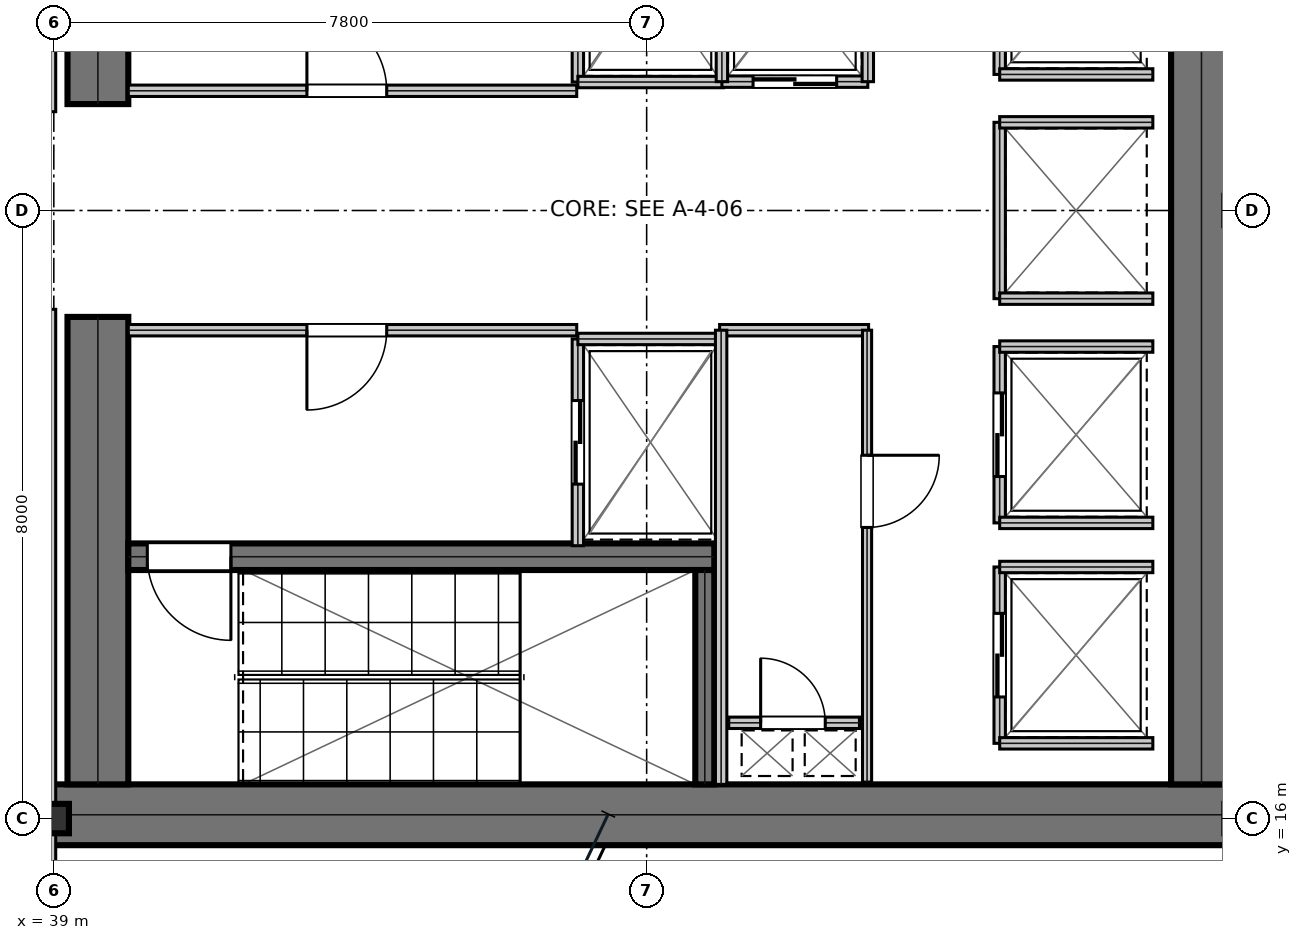
"""IFC4 building model, lengths in metres.
Left out: names, types, materials, properties, quantities, classifications, styles, units other than length and angle.
Written with IfcOpenShell. Run it as: python <this file> out.ifc"""

import sys

from ifc_helpers import new_model, si_unit, direction, frame, frame_2d, origin, origin_2d, place, context, subcontext, project, spatial, rectangle, i_section, extrude, element, fill, save


model = new_model("IFC4")
c1 = context("Model", 3, precision=1e-05, world=origin(), true_north=direction((0.0, 1.0)))
c2 = subcontext(c1, "Body", "Model", "MODEL_VIEW")
j1 = project(units=[si_unit("LENGTHUNIT", "METRE"), si_unit("PLANEANGLEUNIT", "RADIAN")], contexts=[c1])
p1 = place(None, origin())
s1 = spatial("IfcSite", under=j1, at=p1, CompositionType="ELEMENT")
p2 = place(p1, origin())
s2 = spatial("IfcBuilding", under=s1, at=p2, CompositionType="ELEMENT")
p3 = place(p2, frame((0.0, 0.0, 112.05)))
s3 = spatial("IfcBuildingStorey", under=s2, at=p3, CompositionType="ELEMENT", Elevation=112.05)
p4 = place(p3, frame((38.8, 16.05, 0.0), z_axis=(0.0, 0.0, 1.0), x_axis=(1.0, 0.0, 0.0)))
e1 = element("IfcWall", 1, at=p4, inside=s3, PredefinedType="SHEAR", context=c2, shape_type="SweptSolid", body=[
    extrude(rectangle(XDim=16.0, YDim=0.8, at=frame_2d((8.0, 0.0))), origin(), (0.0, 0.0, 1.0), 4.56),
])
for number, where, z_axis, x_axis in (
    (2, (39.58, 16.45, 0.0), (0.0, 0.0, 1.0), (0.0, 1.0, 0.0)),
    (3, (39.58, 25.4, 0.0), (0.0, 0.0, 1.0), (0.0, 1.0, 0.0)),
):
    element("IfcWall", number, at=place(p3, frame(where, z_axis=z_axis, x_axis=x_axis)), inside=s3, PredefinedType="SHEAR", context=c2, shape_type="SweptSolid", body=[
        extrude(rectangle(XDim=6.15, YDim=0.8, at=frame_2d((3.075, 0.0))), origin(), (0.0, 0.0, 1.0), 4.56),
    ])
p5 = place(p3, frame((54.1, 16.45, 0.0), z_axis=(0.0, 0.0, 1.0), x_axis=(0.0, 1.0, 0.0)))
e4 = element("IfcWall", 4, at=p5, inside=s3, PredefinedType="SHEAR", context=c2, shape_type="SweptSolid", body=[
    extrude(rectangle(XDim=15.1, YDim=0.8, at=frame_2d((7.55, 0.0))), origin(), (0.0, 0.0, 1.0), 4.56),
])
p6 = place(p3, frame((39.98, 19.445, 0.0), z_axis=(0.0, 0.0, 1.0), x_axis=(1.0, 0.0, 0.0)))
e5 = element("IfcWall", 5, at=p6, inside=s3, PredefinedType="SHEAR", context=c2, shape_type="SweptSolid", body=[
    extrude(rectangle(XDim=7.71, YDim=0.35, at=frame_2d((3.855, 0.0))), origin(), (0.0, 0.0, 1.0), 4.56),
])
p7 = place(p6, frame((0.25, 0.0, 0.0)))
e6 = element("IfcOpeningElement", 6, at=p7, cuts=e5, PredefinedType="OPENING", context=c2, shape_type="SweptSolid", body=[
    extrude(rectangle(XDim=1.1, YDim=2.15, at=frame_2d((0.55, 1.075))), frame((0.0, 0.185, 0.0), z_axis=(0.0, -1.0, 0.0), x_axis=(1.0, 0.0, 0.0)), (0.0, 0.0, 1.0), 0.37),
])
p8 = place(p3, frame((47.565, 16.45, 0.0), z_axis=(0.0, 0.0, 1.0), x_axis=(0.0, 1.0, 0.0)))
e7 = element("IfcWall", 7, at=p8, inside=s3, PredefinedType="SHEAR", context=c2, shape_type="SweptSolid", body=[
    extrude(rectangle(XDim=2.82, YDim=0.25, at=frame_2d((1.41, 0.0))), origin(), (0.0, 0.0, 1.0), 4.56),
])
p9 = place(p3, frame((39.0, 16.0, 0.0), z_axis=(0.0, 0.0, 1.0), x_axis=(1.0, 0.0, 0.0)))
e8 = element("IfcColumn", 8, at=p9, inside=s3, PredefinedType="COLUMN", context=c2, shape_type="SweptSolid", body=[
    extrude(i_section(OverallWidth=0.398, OverallDepth=0.387, WebThickness=0.021, FlangeThickness=0.033, at=origin_2d()), origin(), (0.0, 0.0, 1.0), 4.794),
])
p10 = place(p3, frame((39.98, 25.575, 0.0), z_axis=(0.0, 0.0, 1.0), x_axis=(1.0, 0.0, 0.0)))
e9 = element("IfcWall", 9, at=p10, inside=s3, PredefinedType="PARTITIONING", context=c2, shape_type="SweptSolid", body=[
    extrude(rectangle(XDim=5.9, YDim=0.15, at=frame_2d((2.95, 0.0))), origin(), (0.0, 0.0, 1.0), 4.56),
])
p11 = place(p10, frame((2.35, 0.0, 0.0)))
e10 = element("IfcOpeningElement", 10, at=p11, cuts=e9, PredefinedType="OPENING", context=c2, shape_type="SweptSolid", body=[
    extrude(rectangle(XDim=1.05, YDim=2.15, at=frame_2d((0.525, 1.075))), frame((0.0, 0.085, 0.0), z_axis=(0.0, -1.0, 0.0), x_axis=(1.0, 0.0, 0.0)), (0.0, 0.0, 1.0), 0.17),
])
p12 = place(p3, frame((39.98, 22.425, 0.0), z_axis=(0.0, 0.0, 1.0), x_axis=(1.0, 0.0, 0.0)))
e11 = element("IfcWall", 11, at=p12, inside=s3, PredefinedType="PARTITIONING", context=c2, shape_type="SweptSolid", body=[
    extrude(rectangle(XDim=5.9, YDim=0.15, at=frame_2d((2.95, 0.0))), origin(), (0.0, 0.0, 1.0), 4.56),
])
p13 = place(p12, frame((2.35, 0.0, 0.0)))
e12 = element("IfcOpeningElement", 12, at=p13, cuts=e11, PredefinedType="OPENING", context=c2, shape_type="SweptSolid", body=[
    extrude(rectangle(XDim=1.05, YDim=2.15, at=frame_2d((0.525, 1.075))), frame((0.0, 0.085, 0.0), z_axis=(0.0, -1.0, 0.0), x_axis=(1.0, 0.0, 0.0)), (0.0, 0.0, 1.0), 0.17),
])
p14 = place(p3, frame((45.895, 25.69, 0.0), z_axis=(0.0, 0.0, 1.0), x_axis=(0.0, 1.0, 0.0)))
e13 = element("IfcWall", 13, at=p14, inside=s3, PredefinedType="PARTITIONING", context=c2, shape_type="SweptSolid", body=[
    extrude(rectangle(XDim=2.72, YDim=0.15, at=frame_2d((1.36, 0.0))), origin(), (0.0, 0.0, 1.0), 4.56),
])
p15 = place(p14, frame((0.81, 0.0, 0.0)))
e14 = element("IfcOpeningElement", 14, at=p15, cuts=e13, PredefinedType="OPENING", context=c2, shape_type="SweptSolid", body=[
    extrude(rectangle(XDim=1.1, YDim=2.15, at=frame_2d((0.55, 1.075))), frame((0.0, 0.085, 0.0), z_axis=(0.0, -1.0, 0.0), x_axis=(1.0, 0.0, 0.0)), (0.0, 0.0, 1.0), 0.17),
])
p16 = place(p3, frame((45.895, 25.69, 0.0), z_axis=(0.0, 0.0, 1.0), x_axis=(1.0, 0.0, 0.0)))
e15 = element("IfcWall", 15, at=p16, inside=s3, PredefinedType="PARTITIONING", context=c2, shape_type="SweptSolid", body=[
    extrude(rectangle(XDim=1.915, YDim=0.15, at=frame_2d((0.958, 0.0))), origin(), (0.0, 0.0, 1.0), 4.56),
])
p17 = place(p3, frame((45.895, 19.59, 0.0), z_axis=(0.0, 0.0, 1.0), x_axis=(0.0, 1.0, 0.0)))
e16 = element("IfcWall", 16, at=p17, inside=s3, PredefinedType="PARTITIONING", context=c2, shape_type="SweptSolid", body=[
    extrude(rectangle(XDim=2.72, YDim=0.15, at=frame_2d((1.36, 0.0))), origin(), (0.0, 0.0, 1.0), 4.56),
])
p18 = place(p17, frame((0.81, 0.0, 0.0)))
e17 = element("IfcOpeningElement", 17, at=p18, cuts=e16, PredefinedType="OPENING", context=c2, shape_type="SweptSolid", body=[
    extrude(rectangle(XDim=1.1, YDim=2.15, at=frame_2d((0.55, 1.075))), frame((0.0, 0.085, 0.0), z_axis=(0.0, -1.0, 0.0), x_axis=(1.0, 0.0, 0.0)), (0.0, 0.0, 1.0), 0.17),
])
p19 = place(p3, frame((45.895, 22.31, 0.0), z_axis=(0.0, 0.0, 1.0), x_axis=(1.0, 0.0, 0.0)))
e18 = element("IfcWall", 18, at=p19, inside=s3, PredefinedType="PARTITIONING", context=c2, shape_type="SweptSolid", body=[
    extrude(rectangle(XDim=1.915, YDim=0.15, at=frame_2d((0.958, 0.0))), origin(), (0.0, 0.0, 1.0), 4.56),
])
p20 = place(p3, frame((47.79, 25.695, 0.0), z_axis=(0.0, 0.0, 1.0), x_axis=(1.0, 0.0, 0.0)))
e19 = element("IfcWall", 19, at=p20, inside=s3, PredefinedType="PARTITIONING", context=c2, shape_type="SweptSolid", body=[
    extrude(rectangle(XDim=1.92, YDim=0.15, at=frame_2d((0.96, 0.0))), origin(), (0.0, 0.0, 1.0), 4.56),
])
p21 = place(p20, frame((0.41, 0.0, 0.0)))
e20 = element("IfcOpeningElement", 20, at=p21, cuts=e19, PredefinedType="OPENING", context=c2, shape_type="SweptSolid", body=[
    extrude(rectangle(XDim=1.1, YDim=2.15, at=frame_2d((0.55, 1.075))), frame((0.0, 0.085, 0.0), z_axis=(0.0, -1.0, 0.0), x_axis=(1.0, 0.0, 0.0)), (0.0, 0.0, 1.0), 0.17),
])
for number, where, z_axis, x_axis in (
    (21, (47.79, 25.695, 0.0), (0.0, 0.0, 1.0), (0.0, 1.0, 0.0)),
    (22, (49.71, 25.695, 0.0), (0.0, 0.0, 1.0), (0.0, 1.0, 0.0)),
):
    element("IfcWall", number, at=place(p3, frame(where, z_axis=z_axis, x_axis=x_axis)), inside=s3, PredefinedType="PARTITIONING", context=c2, shape_type="SweptSolid", body=[
        extrude(rectangle(XDim=2.415, YDim=0.15, at=frame_2d((1.208, 0.0))), origin(), (0.0, 0.0, 1.0), 4.56),
    ])
p22 = place(p3, frame((51.445, 25.79, 0.0), z_axis=(0.0, 0.0, 1.0), x_axis=(0.0, 1.0, 0.0)))
e23 = element("IfcWall", 23, at=p22, inside=s3, PredefinedType="PARTITIONING", context=c2, shape_type="SweptSolid", body=[
    extrude(rectangle(XDim=2.32, YDim=0.15, at=frame_2d((1.16, 0.0))), origin(), (0.0, 0.0, 1.0), 4.56),
])
p23 = place(p22, frame((0.61, 0.0, 0.0)))
e24 = element("IfcOpeningElement", 24, at=p23, cuts=e23, PredefinedType="OPENING", context=c2, shape_type="SweptSolid", body=[
    extrude(rectangle(XDim=1.1, YDim=2.15, at=frame_2d((0.55, 1.075))), frame((0.0, 0.085, 0.0), z_axis=(0.0, -1.0, 0.0), x_axis=(1.0, 0.0, 0.0)), (0.0, 0.0, 1.0), 0.17),
])
p24 = place(p3, frame((51.445, 25.79, 0.0), z_axis=(0.0, 0.0, 1.0), x_axis=(1.0, 0.0, 0.0)))
e25 = element("IfcWall", 25, at=p24, inside=s3, PredefinedType="PARTITIONING", context=c2, shape_type="SweptSolid", body=[
    extrude(rectangle(XDim=2.015, YDim=0.15, at=frame_2d((1.007, 0.0))), origin(), (0.0, 0.0, 1.0), 4.56),
])
p25 = place(p3, frame((51.445, 19.89, 0.0), z_axis=(0.0, 0.0, 1.0), x_axis=(0.0, 1.0, 0.0)))
e26 = element("IfcWall", 26, at=p25, inside=s3, PredefinedType="PARTITIONING", context=c2, shape_type="SweptSolid", body=[
    extrude(rectangle(XDim=2.32, YDim=0.15, at=frame_2d((1.16, 0.0))), origin(), (0.0, 0.0, 1.0), 4.56),
])
p26 = place(p25, frame((0.61, 0.0, 0.0)))
e27 = element("IfcOpeningElement", 27, at=p26, cuts=e26, PredefinedType="OPENING", context=c2, shape_type="SweptSolid", body=[
    extrude(rectangle(XDim=1.1, YDim=2.15, at=frame_2d((0.55, 1.075))), frame((0.0, 0.085, 0.0), z_axis=(0.0, -1.0, 0.0), x_axis=(1.0, 0.0, 0.0)), (0.0, 0.0, 1.0), 0.17),
])
for number, where, z_axis, x_axis in (
    (28, (51.445, 19.89, 0.0), (0.0, 0.0, 1.0), (1.0, 0.0, 0.0)),
    (29, (51.445, 22.21, 0.0), (0.0, 0.0, 1.0), (1.0, 0.0, 0.0)),
):
    element("IfcWall", number, at=place(p3, frame(where, z_axis=z_axis, x_axis=x_axis)), inside=s3, PredefinedType="PARTITIONING", context=c2, shape_type="SweptSolid", body=[
        extrude(rectangle(XDim=2.015, YDim=0.15, at=frame_2d((1.007, 0.0))), origin(), (0.0, 0.0, 1.0), 4.56),
    ])
p27 = place(p3, frame((51.445, 22.84, 0.0), z_axis=(0.0, 0.0, 1.0), x_axis=(0.0, 1.0, 0.0)))
e30 = element("IfcWall", 30, at=p27, inside=s3, PredefinedType="PARTITIONING", context=c2, shape_type="SweptSolid", body=[
    extrude(rectangle(XDim=2.32, YDim=0.15, at=frame_2d((1.16, 0.0))), origin(), (0.0, 0.0, 1.0), 4.56),
])
for number, where, z_axis, x_axis in (
    (31, (51.445, 22.84, 0.0), (0.0, 0.0, 1.0), (1.0, 0.0, 0.0)),
    (32, (51.445, 25.16, 0.0), (0.0, 0.0, 1.0), (1.0, 0.0, 0.0)),
):
    element("IfcWall", number, at=place(p3, frame(where, z_axis=z_axis, x_axis=x_axis)), inside=s3, PredefinedType="PARTITIONING", context=c2, shape_type="SweptSolid", body=[
        extrude(rectangle(XDim=2.015, YDim=0.15, at=frame_2d((1.007, 0.0))), origin(), (0.0, 0.0, 1.0), 4.56),
    ])
p28 = place(p3, frame((51.445, 16.99, 0.0), z_axis=(0.0, 0.0, 1.0), x_axis=(0.0, 1.0, 0.0)))
e33 = element("IfcWall", 33, at=p28, inside=s3, PredefinedType="PARTITIONING", context=c2, shape_type="SweptSolid", body=[
    extrude(rectangle(XDim=2.32, YDim=0.15, at=frame_2d((1.16, 0.0))), origin(), (0.0, 0.0, 1.0), 4.56),
])
p29 = place(p28, frame((0.61, 0.0, 0.0)))
e34 = element("IfcOpeningElement", 34, at=p29, cuts=e33, PredefinedType="OPENING", context=c2, shape_type="SweptSolid", body=[
    extrude(rectangle(XDim=1.1, YDim=2.15, at=frame_2d((0.55, 1.075))), frame((0.0, 0.085, 0.0), z_axis=(0.0, -1.0, 0.0), x_axis=(1.0, 0.0, 0.0)), (0.0, 0.0, 1.0), 0.17),
])
for number, where, z_axis, x_axis in (
    (35, (51.445, 16.99, 0.0), (0.0, 0.0, 1.0), (1.0, 0.0, 0.0)),
    (36, (51.445, 19.31, 0.0), (0.0, 0.0, 1.0), (1.0, 0.0, 0.0)),
):
    element("IfcWall", number, at=place(p3, frame(where, z_axis=z_axis, x_axis=x_axis)), inside=s3, PredefinedType="PARTITIONING", context=c2, shape_type="SweptSolid", body=[
        extrude(rectangle(XDim=2.015, YDim=0.15, at=frame_2d((1.007, 0.0))), origin(), (0.0, 0.0, 1.0), 4.56),
    ])
p30 = place(p3, frame((47.88, 17.26, 0.0), z_axis=(0.0, 0.0, 1.0), x_axis=(1.0, 0.0, 0.0)))
e37 = element("IfcWall", 37, at=p30, inside=s3, PredefinedType="PARTITIONING", context=c2, shape_type="SweptSolid", body=[
    extrude(rectangle(XDim=1.72, YDim=0.15, at=frame_2d((0.86, 0.0))), origin(), (0.0, 0.0, 1.0), 4.56),
])
p31 = place(p30, frame((0.42, 0.0, 0.0)))
e38 = element("IfcOpeningElement", 38, at=p31, cuts=e37, PredefinedType="OPENING", context=c2, shape_type="SweptSolid", body=[
    extrude(rectangle(XDim=0.85, YDim=2.15, at=frame_2d((0.425, 1.075))), frame((0.0, 0.085, 0.0), z_axis=(0.0, -1.0, 0.0), x_axis=(1.0, 0.0, 0.0)), (0.0, 0.0, 1.0), 0.17),
])
p32 = place(p3, frame((47.76, 22.425, 0.0), z_axis=(0.0, 0.0, 1.0), x_axis=(1.0, 0.0, 0.0)))
e39 = element("IfcWall", 39, at=p32, inside=s3, PredefinedType="PARTITIONING", context=c2, shape_type="SweptSolid", body=[
    extrude(rectangle(XDim=1.96, YDim=0.15, at=frame_2d((0.98, 0.0))), origin(), (0.0, 0.0, 1.0), 4.56),
])
p33 = place(p3, frame((47.78, 16.45, 0.0), z_axis=(0.0, 0.0, 1.0), x_axis=(0.0, 1.0, 0.0)))
e40 = element("IfcWall", 40, at=p33, inside=s3, PredefinedType="PARTITIONING", context=c2, shape_type="SweptSolid", body=[
    extrude(rectangle(XDim=5.975, YDim=0.15, at=frame_2d((2.988, 0.0))), origin(), (0.0, 0.0, 1.0), 4.56),
])
p34 = place(p3, frame((49.7, 16.48, 0.0), z_axis=(0.0, 0.0, 1.0), x_axis=(0.0, 1.0, 0.0)))
e41 = element("IfcWall", 41, at=p34, inside=s3, PredefinedType="PARTITIONING", context=c2, shape_type="SweptSolid", body=[
    extrude(rectangle(XDim=5.945, YDim=0.12, at=frame_2d((2.973, 0.0))), origin(), (0.0, 0.0, 1.0), 4.56),
])
p35 = place(p34, frame((3.35, 0.0, 0.0)))
e42 = element("IfcOpeningElement", 42, at=p35, cuts=e41, PredefinedType="OPENING", context=c2, shape_type="SweptSolid", body=[
    extrude(rectangle(XDim=0.95, YDim=2.15, at=frame_2d((0.475, 1.075))), frame((0.0, 0.07, 0.0), z_axis=(0.0, -1.0, 0.0), x_axis=(1.0, 0.0, 0.0)), (0.0, 0.0, 1.0), 0.14),
])
for number, where, z_axis, x_axis in (
    (43, (38.95, 14.5, 0.0), (0.0, 0.0, 1.0), (0.0, 1.0, 0.0)),
    (44, (38.95, 25.3, 0.0), (0.0, 0.0, 1.0), (0.0, 1.0, 0.0)),
):
    element("IfcWall", number, at=place(p3, frame(where, z_axis=z_axis, x_axis=x_axis)), inside=s3, PredefinedType="PARTITIONING", context=c2, shape_type="SweptSolid", body=[
        extrude(rectangle(XDim=8.2, YDim=0.15, at=frame_2d((4.1, 0.0))), origin(), (0.0, 0.0, 1.0), 3.94),
    ])
p36 = place(p11, origin())
e45 = element("IfcDoor", 45, at=p36, inside=s3, OperationType="SINGLE_SWING_LEFT", PredefinedType="DOOR", context=c2, shape_type="SweptSolid", body=[
    extrude(rectangle(XDim=1.05, YDim=2.15, at=frame_2d((0.525, 1.075))), frame((0.0, 0.025, 0.0), z_axis=(0.0, -1.0, 0.0), x_axis=(1.0, 0.0, 0.0)), (0.0, 0.0, 1.0), 0.05),
])
fill(e10, e45)
p37 = place(p13, frame((1.05, 0.0, 0.0), z_axis=(0.0, 0.0, 1.0), x_axis=(-1.0, 0.0, 0.0)))
e46 = element("IfcDoor", 46, at=p37, inside=s3, OperationType="SINGLE_SWING_RIGHT", PredefinedType="DOOR", context=c2, shape_type="SweptSolid", body=[
    extrude(rectangle(XDim=1.05, YDim=2.15, at=frame_2d((0.525, 1.075))), frame((0.0, 0.025, 0.0), z_axis=(0.0, -1.0, 0.0), x_axis=(1.0, 0.0, 0.0)), (0.0, 0.0, 1.0), 0.05),
])
fill(e12, e46)
p38 = place(p18, frame((1.1, 0.0, 0.0), z_axis=(0.0, 0.0, 1.0), x_axis=(-1.0, 0.0, 0.0)))
e47 = element("IfcDoor", 47, at=p38, inside=s3, OperationType="DOUBLE_DOOR_SLIDING", PredefinedType="DOOR", context=c2, shape_type="SweptSolid", body=[
    extrude(rectangle(XDim=1.1, YDim=2.15, at=frame_2d((0.55, 1.075))), frame((0.0, 0.025, 0.0), z_axis=(0.0, -1.0, 0.0), x_axis=(1.0, 0.0, 0.0)), (0.0, 0.0, 1.0), 0.05),
])
fill(e17, e47)
p39 = place(p21, frame((1.1, 0.0, 0.0), z_axis=(0.0, 0.0, 1.0), x_axis=(-1.0, 0.0, 0.0)))
e48 = element("IfcDoor", 48, at=p39, inside=s3, OperationType="DOUBLE_DOOR_SLIDING", PredefinedType="DOOR", context=c2, shape_type="SweptSolid", body=[
    extrude(rectangle(XDim=1.1, YDim=2.15, at=frame_2d((0.55, 1.075))), frame((0.0, 0.025, 0.0), z_axis=(0.0, -1.0, 0.0), x_axis=(1.0, 0.0, 0.0)), (0.0, 0.0, 1.0), 0.05),
])
fill(e20, e48)
p40 = place(p26, frame((1.1, 0.0, 0.0), z_axis=(0.0, 0.0, 1.0), x_axis=(-1.0, 0.0, 0.0)))
e49 = element("IfcDoor", 49, at=p40, inside=s3, OperationType="DOUBLE_DOOR_SLIDING", PredefinedType="DOOR", context=c2, shape_type="SweptSolid", body=[
    extrude(rectangle(XDim=1.1, YDim=2.15, at=frame_2d((0.55, 1.075))), frame((0.0, 0.025, 0.0), z_axis=(0.0, -1.0, 0.0), x_axis=(1.0, 0.0, 0.0)), (0.0, 0.0, 1.0), 0.05),
])
fill(e27, e49)
p41 = place(p29, frame((1.1, 0.0, 0.0), z_axis=(0.0, 0.0, 1.0), x_axis=(-1.0, 0.0, 0.0)))
e50 = element("IfcDoor", 50, at=p41, inside=s3, OperationType="DOUBLE_DOOR_SLIDING", PredefinedType="DOOR", context=c2, shape_type="SweptSolid", body=[
    extrude(rectangle(XDim=1.1, YDim=2.15, at=frame_2d((0.55, 1.075))), frame((0.0, 0.025, 0.0), z_axis=(0.0, -1.0, 0.0), x_axis=(1.0, 0.0, 0.0)), (0.0, 0.0, 1.0), 0.05),
])
fill(e34, e50)
p42 = place(p31, origin())
e51 = element("IfcDoor", 51, at=p42, inside=s3, OperationType="SINGLE_SWING_LEFT", PredefinedType="TRAPDOOR", context=c2, shape_type="SweptSolid", body=[
    extrude(rectangle(XDim=0.85, YDim=2.15, at=frame_2d((0.425, 1.075))), frame((0.0, 0.025, 0.0), z_axis=(0.0, -1.0, 0.0), x_axis=(1.0, 0.0, 0.0)), (0.0, 0.0, 1.0), 0.05),
])
fill(e38, e51)
p43 = place(p35, frame((0.95, 0.0, 0.0), z_axis=(0.0, 0.0, 1.0), x_axis=(-1.0, 0.0, 0.0)))
e52 = element("IfcDoor", 52, at=p43, inside=s3, OperationType="SINGLE_SWING_LEFT", PredefinedType="DOOR", context=c2, shape_type="SweptSolid", body=[
    extrude(rectangle(XDim=0.95, YDim=2.15, at=frame_2d((0.475, 1.075))), frame((0.0, 0.025, 0.0), z_axis=(0.0, -1.0, 0.0), x_axis=(1.0, 0.0, 0.0)), (0.0, 0.0, 1.0), 0.05),
])
fill(e42, e52)
p44 = place(p7, frame((1.1, 0.0, 0.0), z_axis=(0.0, 0.0, 1.0), x_axis=(-1.0, 0.0, 0.0)))
e53 = element("IfcDoor", 53, at=p44, inside=s3, OperationType="SINGLE_SWING_LEFT", PredefinedType="DOOR", context=c2, shape_type="SweptSolid", body=[
    extrude(rectangle(XDim=1.1, YDim=2.15, at=frame_2d((0.55, 1.075))), frame((0.0, 0.025, 0.0), z_axis=(0.0, -1.0, 0.0), x_axis=(1.0, 0.0, 0.0)), (0.0, 0.0, 1.0), 0.05),
])
fill(e6, e53)
save(model, sys.argv[1])
